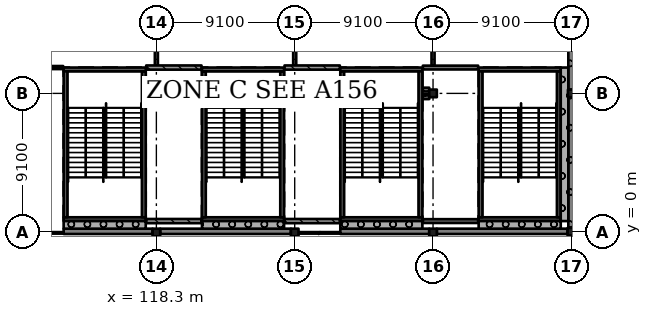
"""IFC4 building model, lengths in metres.
Left out: names, types, materials, properties, quantities, classifications, styles, units other than length and angle.
Written with IfcOpenShell. Run it as: python <this file> out.ifc"""

import sys

from ifc_helpers import new_model, si_unit, direction, frame, frame_2d, origin, origin_2d, place, context, subcontext, project, spatial, rectangle, extrude, element, fill, save


model = new_model("IFC4")
c1 = context("Model", 3, precision=1e-05, world=origin(), true_north=direction((0.0, 1.0)))
c2 = subcontext(c1, "Body", "Model", "MODEL_VIEW")
j1 = project(units=[si_unit("LENGTHUNIT", "METRE"), si_unit("PLANEANGLEUNIT", "RADIAN")], contexts=[c1])
p1 = place(None, origin())
s1 = spatial("IfcSite", under=j1, at=p1, CompositionType="ELEMENT")
p2 = place(p1, origin())
s2 = spatial("IfcBuilding", under=s1, at=p2, CompositionType="ELEMENT")
p3 = place(p2, frame((0.0, 0.0, 20.02)))
s3 = spatial("IfcBuildingStorey", under=s2, at=p3, CompositionType="ELEMENT", Elevation=20.02)
for number, where, z_axis, x_axis in (
    (1, (118.3, -0.05, 0.0), (0.0, 0.0, 1.0), (1.0, 0.0, 0.0)),
    (2, (118.3, 9.1, 0.0), (0.0, 0.0, 1.0), (1.0, 0.0, 0.0)),
    (3, (127.4, -0.05, 0.0), (0.0, 0.0, 1.0), (1.0, 0.0, 0.0)),
    (4, (127.4, 9.1, 0.0), (0.0, 0.0, 1.0), (1.0, 0.0, 0.0)),
    (5, (136.5, -0.05, 0.0), (0.0, 0.0, 1.0), (1.0, 0.0, 0.0)),
    (6, (136.5, 9.1, 0.0), (0.0, 0.0, 1.0), (1.0, 0.0, 0.0)),
    (7, (145.6, 0.0, 0.0), (0.0, 0.0, 1.0), (1.0, 0.0, 0.0)),
    (8, (145.625, 9.1, 0.0), (0.0, 0.0, 1.0), (1.0, 0.0, 0.0)),
):
    element("IfcColumn", number, at=place(p3, frame(where, z_axis=z_axis, x_axis=x_axis)), inside=s3, PredefinedType="COLUMN", context=c2, shape_type="SweptSolid", body=[
        extrude(rectangle(XDim=0.5, YDim=0.5, at=origin_2d()), origin(), (0.0, 0.0, 1.0), 4.55),
    ])
p4 = place(p3, frame((144.9, 0.825, 0.0), z_axis=(0.0, 0.0, 1.0), x_axis=(-1.0, 0.0, 0.0)))
e9 = element("IfcWall", 9, at=p4, inside=s3, PredefinedType="SHEAR", context=c2, shape_type="SweptSolid", body=[
    extrude(rectangle(XDim=5.4, YDim=0.25, at=frame_2d((2.7, 0.0))), origin(), (0.0, 0.0, 1.0), 4.55),
])
p5 = place(p3, frame((144.9, 10.675, 0.0), z_axis=(0.0, 0.0, 1.0), x_axis=(-1.0, 0.0, 0.0)))
e10 = element("IfcWall", 10, at=p5, inside=s3, PredefinedType="SHEAR", context=c2, shape_type="SweptSolid", body=[
    extrude(rectangle(XDim=5.4, YDim=0.25, at=frame_2d((2.7, 0.0))), origin(), (0.0, 0.0, 1.0), 4.55),
])
p6 = place(p5, frame((1.5, 0.0, 0.0)))
e11 = element("IfcOpeningElement", 11, at=p6, cuts=e10, PredefinedType="OPENING", context=c2, shape_type="SweptSolid", body=[
    extrude(rectangle(XDim=2.4, YDim=2.1, at=frame_2d((1.2, 1.05))), frame((0.0, 0.135, 0.0), z_axis=(0.0, -1.0, 0.0), x_axis=(1.0, 0.0, 0.0)), (0.0, 0.0, 1.0), 0.27),
])
for number, where, z_axis, x_axis in (
    (12, (139.625, 10.55, 0.0), (0.0, 0.0, 1.0), (0.0, -1.0, 0.0)),
    (13, (144.775, 10.55, 0.0), (0.0, 0.0, 1.0), (0.0, -1.0, 0.0)),
):
    element("IfcWall", number, at=place(p3, frame(where, z_axis=z_axis, x_axis=x_axis)), inside=s3, PredefinedType="SHEAR", context=c2, shape_type="SweptSolid", body=[
        extrude(rectangle(XDim=9.6, YDim=0.25, at=frame_2d((4.8, 0.0))), origin(), (0.0, 0.0, 1.0), 4.55),
    ])
p7 = place(p3, frame((135.8, 0.825, 0.0), z_axis=(0.0, 0.0, 1.0), x_axis=(-1.0, 0.0, 0.0)))
e14 = element("IfcWall", 14, at=p7, inside=s3, PredefinedType="SHEAR", context=c2, shape_type="SweptSolid", body=[
    extrude(rectangle(XDim=5.4, YDim=0.25, at=frame_2d((2.7, 0.0))), origin(), (0.0, 0.0, 1.0), 4.55),
])
p8 = place(p3, frame((135.8, 10.675, 0.0), z_axis=(0.0, 0.0, 1.0), x_axis=(-1.0, 0.0, 0.0)))
e15 = element("IfcWall", 15, at=p8, inside=s3, PredefinedType="SHEAR", context=c2, shape_type="SweptSolid", body=[
    extrude(rectangle(XDim=5.4, YDim=0.25, at=frame_2d((2.7, 0.0))), origin(), (0.0, 0.0, 1.0), 4.55),
])
p9 = place(p8, frame((1.5, 0.0, 0.0)))
e16 = element("IfcOpeningElement", 16, at=p9, cuts=e15, PredefinedType="OPENING", context=c2, shape_type="SweptSolid", body=[
    extrude(rectangle(XDim=2.4, YDim=2.1, at=frame_2d((1.2, 1.05))), frame((0.0, 0.135, 0.0), z_axis=(0.0, -1.0, 0.0), x_axis=(1.0, 0.0, 0.0)), (0.0, 0.0, 1.0), 0.27),
])
for number, where, z_axis, x_axis in (
    (17, (130.525, 10.55, 0.0), (0.0, 0.0, 1.0), (0.0, -1.0, 0.0)),
    (18, (135.675, 10.55, 0.0), (0.0, 0.0, 1.0), (0.0, -1.0, 0.0)),
):
    element("IfcWall", number, at=place(p3, frame(where, z_axis=z_axis, x_axis=x_axis)), inside=s3, PredefinedType="SHEAR", context=c2, shape_type="SweptSolid", body=[
        extrude(rectangle(XDim=9.6, YDim=0.25, at=frame_2d((4.8, 0.0))), origin(), (0.0, 0.0, 1.0), 4.55),
    ])
p10 = place(p3, frame((126.7, 0.825, 0.0), z_axis=(0.0, 0.0, 1.0), x_axis=(-1.0, 0.0, 0.0)))
e19 = element("IfcWall", 19, at=p10, inside=s3, PredefinedType="SHEAR", context=c2, shape_type="SweptSolid", body=[
    extrude(rectangle(XDim=5.4, YDim=0.25, at=frame_2d((2.7, 0.0))), origin(), (0.0, 0.0, 1.0), 4.55),
])
p11 = place(p3, frame((126.7, 10.675, 0.0), z_axis=(0.0, 0.0, 1.0), x_axis=(-1.0, 0.0, 0.0)))
e20 = element("IfcWall", 20, at=p11, inside=s3, PredefinedType="SHEAR", context=c2, shape_type="SweptSolid", body=[
    extrude(rectangle(XDim=5.4, YDim=0.25, at=frame_2d((2.7, 0.0))), origin(), (0.0, 0.0, 1.0), 4.55),
])
p12 = place(p11, frame((1.5, 0.0, 0.0)))
e21 = element("IfcOpeningElement", 21, at=p12, cuts=e20, PredefinedType="OPENING", context=c2, shape_type="SweptSolid", body=[
    extrude(rectangle(XDim=2.4, YDim=2.1, at=frame_2d((1.2, 1.05))), frame((0.0, 0.135, 0.0), z_axis=(0.0, -1.0, 0.0), x_axis=(1.0, 0.0, 0.0)), (0.0, 0.0, 1.0), 0.27),
])
for number, where, z_axis, x_axis in (
    (22, (121.425, 10.55, 0.0), (0.0, 0.0, 1.0), (0.0, -1.0, 0.0)),
    (23, (126.575, 10.55, 0.0), (0.0, 0.0, 1.0), (0.0, -1.0, 0.0)),
):
    element("IfcWall", number, at=place(p3, frame(where, z_axis=z_axis, x_axis=x_axis)), inside=s3, PredefinedType="SHEAR", context=c2, shape_type="SweptSolid", body=[
        extrude(rectangle(XDim=9.6, YDim=0.25, at=frame_2d((4.8, 0.0))), origin(), (0.0, 0.0, 1.0), 4.55),
    ])
p13 = place(p3, frame((117.6, 0.825, 0.0), z_axis=(0.0, 0.0, 1.0), x_axis=(-1.0, 0.0, 0.0)))
e24 = element("IfcWall", 24, at=p13, inside=s3, PredefinedType="SHEAR", context=c2, shape_type="SweptSolid", body=[
    extrude(rectangle(XDim=5.4, YDim=0.25, at=frame_2d((2.7, 0.0))), origin(), (0.0, 0.0, 1.0), 4.55),
])
p14 = place(p3, frame((117.6, 10.675, 0.0), z_axis=(0.0, 0.0, 1.0), x_axis=(-1.0, 0.0, 0.0)))
e25 = element("IfcWall", 25, at=p14, inside=s3, PredefinedType="SHEAR", context=c2, shape_type="SweptSolid", body=[
    extrude(rectangle(XDim=5.4, YDim=0.25, at=frame_2d((2.7, 0.0))), origin(), (0.0, 0.0, 1.0), 4.55),
])
p15 = place(p14, frame((1.5, 0.0, 0.0)))
e26 = element("IfcOpeningElement", 26, at=p15, cuts=e25, PredefinedType="OPENING", context=c2, shape_type="SweptSolid", body=[
    extrude(rectangle(XDim=2.4, YDim=2.1, at=frame_2d((1.2, 1.05))), frame((0.0, 0.135, 0.0), z_axis=(0.0, -1.0, 0.0), x_axis=(1.0, 0.0, 0.0)), (0.0, 0.0, 1.0), 0.27),
])
for number, where, z_axis, x_axis in (
    (27, (112.325, 10.55, 0.0), (0.0, 0.0, 1.0), (0.0, -1.0, 0.0)),
    (28, (117.475, 10.55, 0.0), (0.0, 0.0, 1.0), (0.0, -1.0, 0.0)),
):
    element("IfcWall", number, at=place(p3, frame(where, z_axis=z_axis, x_axis=x_axis)), inside=s3, PredefinedType="SHEAR", context=c2, shape_type="SweptSolid", body=[
        extrude(rectangle(XDim=9.6, YDim=0.25, at=frame_2d((4.8, 0.0))), origin(), (0.0, 0.0, 1.0), 4.55),
    ])
p16 = place(p3, frame((112.2, 0.025, 0.0), z_axis=(0.0, 0.0, 1.0), x_axis=(1.0, 0.0, 0.0)))
e29 = element("IfcWall", 29, at=p16, inside=s3, PredefinedType="SOLIDWALL", context=c2, shape_type="SweptSolid", body=[
    extrude(rectangle(XDim=5.85, YDim=0.35, at=frame_2d((2.925, 0.0))), origin(), (0.0, 0.0, 1.0), 3.5),
])
p17 = place(p3, frame((118.55, 0.025, 0.0), z_axis=(0.0, 0.0, 1.0), x_axis=(1.0, 0.0, 0.0)))
e30 = element("IfcWall", 30, at=p17, inside=s3, PredefinedType="SOLIDWALL", context=c2, shape_type="SweptSolid", body=[
    extrude(rectangle(XDim=8.6, YDim=0.35, at=frame_2d((4.3, 0.0))), origin(), (0.0, 0.0, 1.0), 3.5),
])
p18 = place(p3, frame((130.4, 0.025, 0.0), z_axis=(0.0, 0.0, 1.0), x_axis=(1.0, 0.0, 0.0)))
e31 = element("IfcWall", 31, at=p18, inside=s3, PredefinedType="SOLIDWALL", context=c2, shape_type="SweptSolid", body=[
    extrude(rectangle(XDim=5.85, YDim=0.35, at=frame_2d((2.925, 0.0))), origin(), (0.0, 0.0, 1.0), 3.5),
])
for number, where, z_axis, x_axis in (
    (32, (136.75, 0.025, 0.0), (0.0, 0.0, 1.0), (1.0, 0.0, 0.0)),
    (33, (145.575, 0.25, 0.0), (0.0, 0.0, 1.0), (0.0, 1.0, 0.0)),
):
    element("IfcWall", number, at=place(p3, frame(where, z_axis=z_axis, x_axis=x_axis)), inside=s3, PredefinedType="SOLIDWALL", context=c2, shape_type="SweptSolid", body=[
        extrude(rectangle(XDim=8.6, YDim=0.35, at=frame_2d((4.3, 0.0))), origin(), (0.0, 0.0, 1.0), 3.5),
    ])
p19 = place(p3, frame((145.575, 9.35, 0.0), z_axis=(0.0, 0.0, 1.0), x_axis=(0.0, 1.0, 0.0)))
e34 = element("IfcWall", 34, at=p19, inside=s3, PredefinedType="SOLIDWALL", context=c2, shape_type="SweptSolid", body=[
    extrude(rectangle(XDim=8.6, YDim=0.35, at=frame_2d((4.3, 0.0))), origin(), (0.0, 0.0, 1.0), 3.5),
])
p20 = place(p3, frame((139.5, 0.45, 0.0), z_axis=(0.0, 0.0, 1.0), x_axis=(1.0, 0.0, 0.0)))
e35 = element("IfcWall", 35, at=p20, inside=s3, PredefinedType="SOLIDWALL", context=c2, shape_type="SweptSolid", body=[
    extrude(rectangle(XDim=5.4, YDim=0.5, at=frame_2d((2.7, 0.0))), origin(), (0.0, 0.0, 1.0), 4.25),
])
p21 = place(p3, frame((145.15, 0.7, 0.0), z_axis=(0.0, 0.0, 1.0), x_axis=(0.0, 1.0, 0.0)))
e36 = element("IfcWall", 36, at=p21, inside=s3, PredefinedType="SOLIDWALL", context=c2, shape_type="SweptSolid", body=[
    extrude(rectangle(XDim=10.1, YDim=0.5, at=frame_2d((5.05, 0.0))), origin(), (0.0, 0.0, 1.0), 4.55),
])
p22 = place(p3, frame((130.4, 0.45, 0.0), z_axis=(0.0, 0.0, 1.0), x_axis=(1.0, 0.0, 0.0)))
e37 = element("IfcWall", 37, at=p22, inside=s3, PredefinedType="SOLIDWALL", context=c2, shape_type="SweptSolid", body=[
    extrude(rectangle(XDim=5.4, YDim=0.5, at=frame_2d((2.7, 0.0))), origin(), (0.0, 0.0, 1.0), 4.25),
])
p23 = place(p3, frame((121.3, 0.45, 0.0), z_axis=(0.0, 0.0, 1.0), x_axis=(1.0, 0.0, 0.0)))
e38 = element("IfcWall", 38, at=p23, inside=s3, PredefinedType="SOLIDWALL", context=c2, shape_type="SweptSolid", body=[
    extrude(rectangle(XDim=5.4, YDim=0.5, at=frame_2d((2.7, 0.0))), origin(), (0.0, 0.0, 1.0), 4.25),
])
p24 = place(p3, frame((112.2, 0.45, 0.0), z_axis=(0.0, 0.0, 1.0), x_axis=(1.0, 0.0, 0.0)))
e39 = element("IfcWall", 39, at=p24, inside=s3, PredefinedType="SOLIDWALL", context=c2, shape_type="SweptSolid", body=[
    extrude(rectangle(XDim=5.4, YDim=0.5, at=frame_2d((2.7, 0.0))), origin(), (0.0, 0.0, 1.0), 4.25),
])
p25 = place(p3, frame((112.17, 10.8, 0.0), z_axis=(0.0, 0.0, 1.0), x_axis=(-1.0, 0.0, 0.0)))
e40 = element("IfcWall", 40, at=p25, inside=s3, PredefinedType="PARTITIONING", context=c2, shape_type="SweptSolid", body=[
    extrude(rectangle(XDim=2.77, YDim=0.2, at=frame_2d((1.385, 0.0))), origin(), (0.0, 0.0, 1.0), 4.25),
])
p26 = place(p25, frame((0.45, 0.0, 0.0)))
e41 = element("IfcOpeningElement", 41, at=p26, cuts=e40, PredefinedType="OPENING", context=c2, shape_type="SweptSolid", body=[
    extrude(rectangle(XDim=1.8, YDim=2.4, at=frame_2d((0.9, 1.2))), frame((0.0, 0.11, 0.0), z_axis=(0.0, -1.0, 0.0), x_axis=(1.0, 0.0, 0.0)), (0.0, 0.0, 1.0), 0.22),
])
for number, where, z_axis, x_axis in (
    (42, (117.63, 8.85, 0.0), (0.0, 0.0, 1.0), (1.0, 0.0, 0.0)),
    (43, (118.05, 9.35, 0.0), (0.0, 0.0, 1.0), (-1.0, 0.0, 0.0)),
):
    element("IfcWall", number, at=place(p3, frame(where, z_axis=z_axis, x_axis=x_axis)), inside=s3, PredefinedType="SOLIDWALL", context=c2, shape_type="SweptSolid", body=[
        extrude(rectangle(XDim=0.42, YDim=0.275, at=frame_2d((0.21, 0.0))), origin(), (0.0, 0.0, 1.0), 4.25),
    ])
p27 = place(p3, frame((117.63, 10.8, 0.0), z_axis=(0.0, 0.0, 1.0), x_axis=(1.0, 0.0, 0.0)))
e44 = element("IfcWall", 44, at=p27, inside=s3, PredefinedType="SOLIDWALL", context=c2, shape_type="SweptSolid", body=[
    extrude(rectangle(XDim=3.64, YDim=0.275, at=frame_2d((1.82, 0.0))), origin(), (0.0, 0.0, 1.0), 4.25),
])
p28 = place(p27, frame((1.59, 0.0, 0.0)))
e45 = element("IfcOpeningElement", 45, at=p28, cuts=e44, PredefinedType="OPENING", context=c2, shape_type="SweptSolid", body=[
    extrude(rectangle(XDim=1.2, YDim=2.4, at=frame_2d((0.6, 1.2))), frame((0.0, 0.147, 0.0), z_axis=(0.0, -1.0, 0.0), x_axis=(1.0, 0.0, 0.0)), (0.0, 0.0, 1.0), 0.295),
])
p29 = place(p3, frame((118.3, 10.938, 0.0), z_axis=(0.0, 0.0, 1.0), x_axis=(0.0, 1.0, 0.0)))
e46 = element("IfcWall", 46, at=p29, inside=s3, PredefinedType="PARTITIONING", context=c2, shape_type="SweptSolid", body=[
    extrude(rectangle(XDim=6.962, YDim=0.2, at=frame_2d((3.481, 0.0))), origin(), (0.0, 0.0, 1.0), 3.5),
])
p30 = place(p29, frame((0.85, 0.0, 0.0)))
e47 = element("IfcOpeningElement", 47, at=p30, cuts=e46, PredefinedType="OPENING", context=c2, shape_type="SweptSolid", body=[
    extrude(rectangle(XDim=1.8, YDim=2.4, at=frame_2d((0.9, 1.2))), frame((0.0, 0.11, 0.0), z_axis=(0.0, -1.0, 0.0), x_axis=(1.0, 0.0, 0.0)), (0.0, 0.0, 1.0), 0.22),
])
p31 = place(p29, frame((4.35, 0.0, 0.0)))
e48 = element("IfcOpeningElement", 48, at=p31, cuts=e46, PredefinedType="OPENING", context=c2, shape_type="SweptSolid", body=[
    extrude(rectangle(XDim=1.8, YDim=2.4, at=frame_2d((0.9, 1.2))), frame((0.0, 0.11, 0.0), z_axis=(0.0, -1.0, 0.0), x_axis=(1.0, 0.0, 0.0)), (0.0, 0.0, 1.0), 0.22),
])
p32 = place(p3, frame((121.27, 0.7, 0.0), z_axis=(0.0, 0.0, 1.0), x_axis=(-1.0, 0.0, 0.0)))
e49 = element("IfcWall", 49, at=p32, inside=s3, PredefinedType="SOLIDWALL", context=c2, shape_type="SweptSolid", body=[
    extrude(rectangle(XDim=3.64, YDim=0.275, at=frame_2d((1.82, 0.0))), origin(), (0.0, 0.0, 1.0), 4.25),
])
for number, where, z_axis, x_axis in (
    (50, (126.73, 8.85, 0.0), (0.0, 0.0, 1.0), (1.0, 0.0, 0.0)),
    (51, (127.15, 9.35, 0.0), (0.0, 0.0, 1.0), (-1.0, 0.0, 0.0)),
):
    element("IfcWall", number, at=place(p3, frame(where, z_axis=z_axis, x_axis=x_axis)), inside=s3, PredefinedType="SOLIDWALL", context=c2, shape_type="SweptSolid", body=[
        extrude(rectangle(XDim=0.42, YDim=0.275, at=frame_2d((0.21, 0.0))), origin(), (0.0, 0.0, 1.0), 4.25),
    ])
p33 = place(p3, frame((126.73, 10.8, 0.0), z_axis=(0.0, 0.0, 1.0), x_axis=(1.0, 0.0, 0.0)))
e52 = element("IfcWall", 52, at=p33, inside=s3, PredefinedType="SOLIDWALL", context=c2, shape_type="SweptSolid", body=[
    extrude(rectangle(XDim=3.64, YDim=0.275, at=frame_2d((1.82, 0.0))), origin(), (0.0, 0.0, 1.0), 4.25),
])
p34 = place(p33, frame((1.59, 0.0, 0.0)))
e53 = element("IfcOpeningElement", 53, at=p34, cuts=e52, PredefinedType="OPENING", context=c2, shape_type="SweptSolid", body=[
    extrude(rectangle(XDim=1.2, YDim=2.4, at=frame_2d((0.6, 1.2))), frame((0.0, 0.147, 0.0), z_axis=(0.0, -1.0, 0.0), x_axis=(1.0, 0.0, 0.0)), (0.0, 0.0, 1.0), 0.295),
])
p35 = place(p3, frame((127.4, 10.938, 0.0), z_axis=(0.0, 0.0, 1.0), x_axis=(0.0, 1.0, 0.0)))
e54 = element("IfcWall", 54, at=p35, inside=s3, PredefinedType="PARTITIONING", context=c2, shape_type="SweptSolid", body=[
    extrude(rectangle(XDim=6.962, YDim=0.2, at=frame_2d((3.481, 0.0))), origin(), (0.0, 0.0, 1.0), 3.5),
])
p36 = place(p35, frame((0.85, 0.0, 0.0)))
e55 = element("IfcOpeningElement", 55, at=p36, cuts=e54, PredefinedType="OPENING", context=c2, shape_type="SweptSolid", body=[
    extrude(rectangle(XDim=1.8, YDim=2.4, at=frame_2d((0.9, 1.2))), frame((0.0, 0.11, 0.0), z_axis=(0.0, -1.0, 0.0), x_axis=(1.0, 0.0, 0.0)), (0.0, 0.0, 1.0), 0.22),
])
p37 = place(p35, frame((4.35, 0.0, 0.0)))
e56 = element("IfcOpeningElement", 56, at=p37, cuts=e54, PredefinedType="OPENING", context=c2, shape_type="SweptSolid", body=[
    extrude(rectangle(XDim=1.8, YDim=2.4, at=frame_2d((0.9, 1.2))), frame((0.0, 0.11, 0.0), z_axis=(0.0, -1.0, 0.0), x_axis=(1.0, 0.0, 0.0)), (0.0, 0.0, 1.0), 0.22),
])
p38 = place(p3, frame((130.37, 0.7, 0.0), z_axis=(0.0, 0.0, 1.0), x_axis=(-1.0, 0.0, 0.0)))
e57 = element("IfcWall", 57, at=p38, inside=s3, PredefinedType="SOLIDWALL", context=c2, shape_type="SweptSolid", body=[
    extrude(rectangle(XDim=3.64, YDim=0.275, at=frame_2d((1.82, 0.0))), origin(), (0.0, 0.0, 1.0), 4.25),
])
for number, where, z_axis, x_axis in (
    (58, (135.83, 8.85, 0.0), (0.0, 0.0, 1.0), (1.0, 0.0, 0.0)),
    (59, (136.25, 9.35, 0.0), (0.0, 0.0, 1.0), (-1.0, 0.0, 0.0)),
):
    element("IfcWall", number, at=place(p3, frame(where, z_axis=z_axis, x_axis=x_axis)), inside=s3, PredefinedType="SOLIDWALL", context=c2, shape_type="SweptSolid", body=[
        extrude(rectangle(XDim=0.42, YDim=0.25, at=frame_2d((0.21, 0.0))), origin(), (0.0, 0.0, 1.0), 4.25),
    ])
p39 = place(p3, frame((135.83, 10.8, 0.0), z_axis=(0.0, 0.0, 1.0), x_axis=(1.0, 0.0, 0.0)))
e60 = element("IfcWall", 60, at=p39, inside=s3, PredefinedType="SOLIDWALL", context=c2, shape_type="SweptSolid", body=[
    extrude(rectangle(XDim=3.64, YDim=0.25, at=frame_2d((1.82, 0.0))), origin(), (0.0, 0.0, 1.0), 4.25),
])
p40 = place(p39, frame((1.79, 0.0, 0.0)))
e61 = element("IfcOpeningElement", 61, at=p40, cuts=e60, PredefinedType="OPENING", context=c2, shape_type="SweptSolid", body=[
    extrude(rectangle(XDim=0.8, YDim=2.1, at=frame_2d((0.4, 1.05))), frame((0.0, 0.135, 0.0), z_axis=(0.0, -1.0, 0.0), x_axis=(1.0, 0.0, 0.0)), (0.0, 0.0, 1.0), 0.27),
])
p41 = place(p3, frame((136.5, 10.925, 0.0), z_axis=(0.0, 0.0, 1.0), x_axis=(0.0, 1.0, 0.0)))
e62 = element("IfcWall", 62, at=p41, inside=s3, PredefinedType="PARTITIONING", context=c2, shape_type="SweptSolid", body=[
    extrude(rectangle(XDim=7.0, YDim=0.2, at=frame_2d((3.5, 0.0))), origin(), (0.0, 0.0, 1.0), 3.5),
])
p42 = place(p41, frame((0.85, 0.0, 0.0)))
e63 = element("IfcOpeningElement", 63, at=p42, cuts=e62, PredefinedType="OPENING", context=c2, shape_type="SweptSolid", body=[
    extrude(rectangle(XDim=1.8, YDim=2.4, at=frame_2d((0.9, 1.2))), frame((0.0, 0.11, 0.0), z_axis=(0.0, -1.0, 0.0), x_axis=(1.0, 0.0, 0.0)), (0.0, 0.0, 1.0), 0.22),
])
p43 = place(p41, frame((4.35, 0.0, 0.0)))
e64 = element("IfcOpeningElement", 64, at=p43, cuts=e62, PredefinedType="OPENING", context=c2, shape_type="SweptSolid", body=[
    extrude(rectangle(XDim=1.8, YDim=2.4, at=frame_2d((0.9, 1.2))), frame((0.0, 0.11, 0.0), z_axis=(0.0, -1.0, 0.0), x_axis=(1.0, 0.0, 0.0)), (0.0, 0.0, 1.0), 0.22),
])
p44 = place(p3, frame((139.47, 0.7, 0.0), z_axis=(0.0, 0.0, 1.0), x_axis=(-1.0, 0.0, 0.0)))
e65 = element("IfcWall", 65, at=p44, inside=s3, PredefinedType="SOLIDWALL", context=c2, shape_type="SweptSolid", body=[
    extrude(rectangle(XDim=3.64, YDim=0.25, at=frame_2d((1.82, 0.0))), origin(), (0.0, 0.0, 1.0), 4.25),
])
p45 = place(p40, origin())
e66 = element("IfcDoor", 66, at=p45, inside=s3, OperationType="SINGLE_SWING_RIGHT", PredefinedType="DOOR", context=c2, shape_type="SweptSolid", body=[
    extrude(rectangle(XDim=0.8, YDim=2.1, at=frame_2d((0.4, 1.05))), frame((0.0, 0.025, 0.0), z_axis=(0.0, -1.0, 0.0), x_axis=(1.0, 0.0, 0.0)), (0.0, 0.0, 1.0), 0.05),
])
fill(e61, e66)
p46 = place(p34, origin())
e67 = element("IfcDoor", 67, at=p46, inside=s3, OperationType="SINGLE_SWING_RIGHT", PredefinedType="DOOR", context=c2, shape_type="SweptSolid", body=[
    extrude(rectangle(XDim=1.2, YDim=2.4, at=frame_2d((0.6, 1.2))), frame((0.0, 0.025, 0.0), z_axis=(0.0, -1.0, 0.0), x_axis=(1.0, 0.0, 0.0)), (0.0, 0.0, 1.0), 0.05),
])
fill(e53, e67)
p47 = place(p28, origin())
e68 = element("IfcDoor", 68, at=p47, inside=s3, OperationType="SINGLE_SWING_RIGHT", PredefinedType="DOOR", context=c2, shape_type="SweptSolid", body=[
    extrude(rectangle(XDim=1.2, YDim=2.4, at=frame_2d((0.6, 1.2))), frame((0.0, 0.025, 0.0), z_axis=(0.0, -1.0, 0.0), x_axis=(1.0, 0.0, 0.0)), (0.0, 0.0, 1.0), 0.05),
])
fill(e45, e68)
p48 = place(p42, origin())
e69 = element("IfcDoor", 69, at=p48, inside=s3, OperationType="DOUBLE_DOOR_SINGLE_SWING", PredefinedType="DOOR", context=c2, shape_type="SweptSolid", body=[
    extrude(rectangle(XDim=1.8, YDim=2.4, at=frame_2d((0.9, 1.2))), frame((0.0, 0.025, 0.0), z_axis=(0.0, -1.0, 0.0), x_axis=(1.0, 0.0, 0.0)), (0.0, 0.0, 1.0), 0.05),
])
fill(e63, e69)
p49 = place(p36, origin())
e70 = element("IfcDoor", 70, at=p49, inside=s3, OperationType="DOUBLE_DOOR_SINGLE_SWING", PredefinedType="DOOR", context=c2, shape_type="SweptSolid", body=[
    extrude(rectangle(XDim=1.8, YDim=2.4, at=frame_2d((0.9, 1.2))), frame((0.0, 0.025, 0.0), z_axis=(0.0, -1.0, 0.0), x_axis=(1.0, 0.0, 0.0)), (0.0, 0.0, 1.0), 0.05),
])
fill(e55, e70)
p50 = place(p30, origin())
e71 = element("IfcDoor", 71, at=p50, inside=s3, OperationType="DOUBLE_DOOR_SINGLE_SWING", PredefinedType="DOOR", context=c2, shape_type="SweptSolid", body=[
    extrude(rectangle(XDim=1.8, YDim=2.4, at=frame_2d((0.9, 1.2))), frame((0.0, 0.025, 0.0), z_axis=(0.0, -1.0, 0.0), x_axis=(1.0, 0.0, 0.0)), (0.0, 0.0, 1.0), 0.05),
])
fill(e47, e71)
p51 = place(p26, origin())
e72 = element("IfcDoor", 72, at=p51, inside=s3, OperationType="DOUBLE_DOOR_SINGLE_SWING", PredefinedType="DOOR", context=c2, shape_type="SweptSolid", body=[
    extrude(rectangle(XDim=1.8, YDim=2.4, at=frame_2d((0.9, 1.2))), frame((0.0, 0.025, 0.0), z_axis=(0.0, -1.0, 0.0), x_axis=(1.0, 0.0, 0.0)), (0.0, 0.0, 1.0), 0.05),
])
fill(e41, e72)
p52 = place(p6, origin())
e73 = element("IfcDoor", 73, at=p52, inside=s3, OperationType="DOUBLE_DOOR_SINGLE_SWING", PredefinedType="DOOR", context=c2, shape_type="SweptSolid", body=[
    extrude(rectangle(XDim=2.4, YDim=2.1, at=frame_2d((1.2, 1.05))), frame((0.0, 0.025, 0.0), z_axis=(0.0, -1.0, 0.0), x_axis=(1.0, 0.0, 0.0)), (0.0, 0.0, 1.0), 0.05),
])
fill(e11, e73)
p53 = place(p9, origin())
e74 = element("IfcDoor", 74, at=p53, inside=s3, OperationType="DOUBLE_DOOR_SINGLE_SWING", PredefinedType="DOOR", context=c2, shape_type="SweptSolid", body=[
    extrude(rectangle(XDim=2.4, YDim=2.1, at=frame_2d((1.2, 1.05))), frame((0.0, 0.025, 0.0), z_axis=(0.0, -1.0, 0.0), x_axis=(1.0, 0.0, 0.0)), (0.0, 0.0, 1.0), 0.05),
])
fill(e16, e74)
p54 = place(p12, origin())
e75 = element("IfcDoor", 75, at=p54, inside=s3, OperationType="DOUBLE_DOOR_SINGLE_SWING", PredefinedType="DOOR", context=c2, shape_type="SweptSolid", body=[
    extrude(rectangle(XDim=2.4, YDim=2.1, at=frame_2d((1.2, 1.05))), frame((0.0, 0.025, 0.0), z_axis=(0.0, -1.0, 0.0), x_axis=(1.0, 0.0, 0.0)), (0.0, 0.0, 1.0), 0.05),
])
fill(e21, e75)
p55 = place(p15, origin())
e76 = element("IfcDoor", 76, at=p55, inside=s3, OperationType="DOUBLE_DOOR_SINGLE_SWING", PredefinedType="DOOR", context=c2, shape_type="SweptSolid", body=[
    extrude(rectangle(XDim=2.4, YDim=2.1, at=frame_2d((1.2, 1.05))), frame((0.0, 0.025, 0.0), z_axis=(0.0, -1.0, 0.0), x_axis=(1.0, 0.0, 0.0)), (0.0, 0.0, 1.0), 0.05),
])
fill(e26, e76)
save(model, sys.argv[1])
